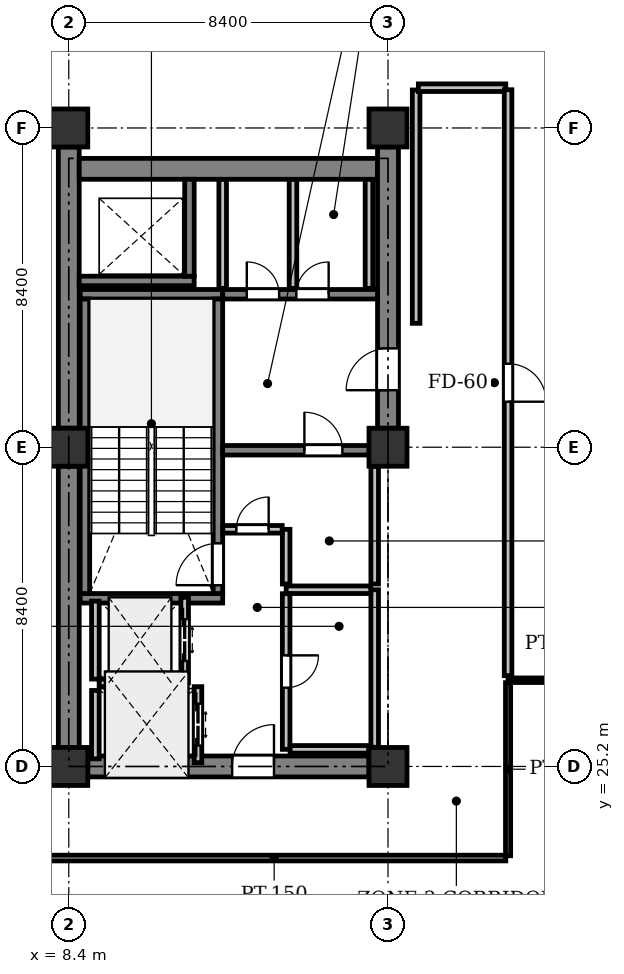
"""IFC4 building model, lengths in metres.
Left out: names, types, materials, properties, quantities, classifications, styles, units other than length and angle.
Written with IfcOpenShell. Run it as: python <this file> out.ifc"""

import sys

from ifc_helpers import new_model, si_unit, direction, frame, frame_2d, origin, origin_2d, place, context, subcontext, project, spatial, rectangle, extrude, element, fill, save


model = new_model("IFC4")
c1 = context("Model", 3, precision=1e-05, world=origin(), true_north=direction((0.0, 1.0)))
c2 = subcontext(c1, "Body", "Model", "MODEL_VIEW")
j1 = project(units=[si_unit("LENGTHUNIT", "METRE"), si_unit("PLANEANGLEUNIT", "RADIAN")], contexts=[c1])
p1 = place(None, origin())
s1 = spatial("IfcSite", under=j1, at=p1, CompositionType="ELEMENT")
p2 = place(p1, origin())
s2 = spatial("IfcBuilding", under=s1, at=p2, CompositionType="ELEMENT")
p3 = place(p2, frame((0.0, 0.0, 208.3)))
s3 = spatial("IfcBuildingStorey", under=s2, at=p3, CompositionType="ELEMENT", Elevation=208.3)
for number, where, z_axis, x_axis in (
    (1, (8.4, 25.2, 0.0), (0.0, 0.0, 1.0), (1.0, 0.0, 0.0)),
    (2, (8.4, 33.6, 0.0), (0.0, 0.0, 1.0), (1.0, 0.0, 0.0)),
    (3, (8.4, 42.0, 0.0), (0.0, 0.0, 1.0), (1.0, 0.0, 0.0)),
    (4, (16.8, 25.2, 0.0), (0.0, 0.0, 1.0), (1.0, 0.0, 0.0)),
    (5, (16.8, 33.6, 0.0), (0.0, 0.0, 1.0), (1.0, 0.0, 0.0)),
    (6, (16.8, 42.0, 0.0), (0.0, 0.0, 1.0), (1.0, 0.0, 0.0)),
):
    element("IfcColumn", number, at=place(p3, frame(where, z_axis=z_axis, x_axis=x_axis)), inside=s3, PredefinedType="COLUMN", context=c2, shape_type="SweptSolid", body=[
        extrude(rectangle(XDim=1.0, YDim=1.0, at=origin_2d()), origin(), (0.0, 0.0, 1.0), 4.1),
    ])
p4 = place(p3, frame((8.4, 25.7, 0.0), z_axis=(0.0, 0.0, 1.0), x_axis=(0.0, 1.0, 0.0)))
e7 = element("IfcWall", 7, at=p4, inside=s3, PredefinedType="SHEAR", context=c2, shape_type="SweptSolid", body=[
    extrude(rectangle(XDim=7.4, YDim=0.55, at=frame_2d((3.7, 0.0))), origin(), (0.0, 0.0, 1.0), 3.825),
])
p5 = place(p3, frame((8.4, 34.1, 0.0), z_axis=(0.0, 0.0, 1.0), x_axis=(0.0, 1.0, 0.0)))
e8 = element("IfcWall", 8, at=p5, inside=s3, PredefinedType="SHEAR", context=c2, shape_type="SweptSolid", body=[
    extrude(rectangle(XDim=7.4, YDim=0.55, at=frame_2d((3.7, 0.0))), origin(), (0.0, 0.0, 1.0), 3.825),
])
p6 = place(p3, frame((8.675, 40.925, 0.0), z_axis=(0.0, 0.0, 1.0), x_axis=(1.0, 0.0, 0.0)))
e9 = element("IfcWall", 9, at=p6, inside=s3, PredefinedType="SHEAR", context=c2, shape_type="SweptSolid", body=[
    extrude(rectangle(XDim=7.85, YDim=0.55, at=frame_2d((3.925, 0.0))), origin(), (0.0, 0.0, 1.0), 3.825),
])
p7 = place(p3, frame((16.8, 34.1, 0.0), z_axis=(0.0, 0.0, 1.0), x_axis=(0.0, 1.0, 0.0)))
e10 = element("IfcWall", 10, at=p7, inside=s3, PredefinedType="SHEAR", context=c2, shape_type="SweptSolid", body=[
    extrude(rectangle(XDim=7.4, YDim=0.55, at=frame_2d((3.7, 0.0))), origin(), (0.0, 0.0, 1.0), 3.825),
])
p8 = place(p7, frame((1.0, 0.0, 0.0)))
e11 = element("IfcOpeningElement", 11, at=p8, cuts=e10, PredefinedType="OPENING", context=c2, shape_type="SweptSolid", body=[
    extrude(rectangle(XDim=1.1, YDim=2.15, at=frame_2d((0.55, 1.075))), frame((0.0, 0.285, 0.0), z_axis=(0.0, -1.0, 0.0), x_axis=(1.0, 0.0, 0.0)), (0.0, 0.0, 1.0), 0.57),
])
p9 = place(p3, frame((8.9, 25.2, 0.0), z_axis=(0.0, 0.0, 1.0), x_axis=(1.0, 0.0, 0.0)))
e12 = element("IfcWall", 12, at=p9, inside=s3, PredefinedType="SHEAR", context=c2, shape_type="SweptSolid", body=[
    extrude(rectangle(XDim=7.4, YDim=0.55, at=frame_2d((3.7, 0.0))), origin(), (0.0, 0.0, 1.0), 3.825),
])
p10 = place(p9, frame((3.8, 0.0, 0.0)))
e13 = element("IfcOpeningElement", 13, at=p10, cuts=e12, PredefinedType="OPENING", context=c2, shape_type="SweptSolid", body=[
    extrude(rectangle(XDim=1.1, YDim=2.15, at=frame_2d((0.55, 1.075))), frame((0.0, 0.285, 0.0), z_axis=(0.0, -1.0, 0.0), x_axis=(1.0, 0.0, 0.0)), (0.0, 0.0, 1.0), 0.57),
])
for number, where, z_axis, x_axis in (
    (14, (12.45, 29.625, 0.0), (0.0, 0.0, 1.0), (-1.0, 0.0, 0.0)),
    (15, (12.45, 37.625, 0.0), (0.0, 0.0, 1.0), (-1.0, 0.0, 0.0)),
):
    element("IfcWall", number, at=place(p3, frame(where, z_axis=z_axis, x_axis=x_axis)), inside=s3, PredefinedType="SHEAR", context=c2, shape_type="SweptSolid", body=[
        extrude(rectangle(XDim=3.75, YDim=0.25, at=frame_2d((1.875, 0.0))), origin(), (0.0, 0.0, 1.0), 3.825),
    ])
p11 = place(p3, frame((12.325, 29.75, 0.0), z_axis=(0.0, 0.0, 1.0), x_axis=(0.0, 1.0, 0.0)))
e16 = element("IfcWall", 16, at=p11, inside=s3, PredefinedType="SHEAR", context=c2, shape_type="SweptSolid", body=[
    extrude(rectangle(XDim=7.75, YDim=0.25, at=frame_2d((3.875, 0.0))), origin(), (0.0, 0.0, 1.0), 3.825),
])
p12 = place(p11, frame((0.22, 0.0, 0.0)))
e17 = element("IfcOpeningElement", 17, at=p12, cuts=e16, PredefinedType="OPENING", context=c2, shape_type="SweptSolid", body=[
    extrude(rectangle(XDim=1.1, YDim=2.15, at=frame_2d((0.55, 1.075))), frame((0.0, 0.135, 0.0), z_axis=(0.0, -1.0, 0.0), x_axis=(1.0, 0.0, 0.0)), (0.0, 0.0, 1.0), 0.27),
])
p13 = place(p3, frame((8.825, 29.75, 0.0), z_axis=(0.0, 0.0, 1.0), x_axis=(0.0, 1.0, 0.0)))
e18 = element("IfcWall", 18, at=p13, inside=s3, PredefinedType="SHEAR", context=c2, shape_type="SweptSolid", body=[
    extrude(rectangle(XDim=7.75, YDim=0.25, at=frame_2d((3.875, 0.0))), origin(), (0.0, 0.0, 1.0), 3.825),
])
p14 = place(p3, frame((8.675, 37.975, 0.0), z_axis=(0.0, 0.0, 1.0), x_axis=(1.0, 0.0, 0.0)))
e19 = element("IfcWall", 19, at=p14, inside=s3, PredefinedType="SHEAR", context=c2, shape_type="SweptSolid", body=[
    extrude(rectangle(XDim=3.025, YDim=0.25, at=frame_2d((1.512, 0.0))), origin(), (0.0, 0.0, 1.0), 3.825),
])
p15 = place(p3, frame((11.575, 38.1, 0.0), z_axis=(0.0, 0.0, 1.0), x_axis=(0.0, 1.0, 0.0)))
e20 = element("IfcWall", 20, at=p15, inside=s3, PredefinedType="SHEAR", context=c2, shape_type="SweptSolid", body=[
    extrude(rectangle(XDim=2.55, YDim=0.25, at=frame_2d((1.275, 0.0))), origin(), (0.0, 0.0, 1.0), 3.825),
])
p16 = place(p3, frame((12.45, 33.52, 0.0), z_axis=(0.0, 0.0, 1.0), x_axis=(1.0, 0.0, 0.0)))
e21 = element("IfcWall", 21, at=p16, inside=s3, PredefinedType="SHEAR", context=c2, shape_type="SweptSolid", body=[
    extrude(rectangle(XDim=3.85, YDim=0.25, at=frame_2d((1.925, 0.0))), origin(), (0.0, 0.0, 1.0), 3.825),
])
p17 = place(p16, frame((2.15, 0.0, 0.0)))
e22 = element("IfcOpeningElement", 22, at=p17, cuts=e21, PredefinedType="OPENING", context=c2, shape_type="SweptSolid", body=[
    extrude(rectangle(XDim=1.0, YDim=2.15, at=frame_2d((0.5, 1.075))), frame((0.0, 0.135, 0.0), z_axis=(0.0, -1.0, 0.0), x_axis=(1.0, 0.0, 0.0)), (0.0, 0.0, 1.0), 0.27),
])
p18 = place(p3, frame((12.45, 37.625, 0.0), z_axis=(0.0, 0.0, 1.0), x_axis=(1.0, 0.0, 0.0)))
e23 = element("IfcWall", 23, at=p18, inside=s3, PredefinedType="SHEAR", context=c2, shape_type="SweptSolid", body=[
    extrude(rectangle(XDim=4.075, YDim=0.25, at=frame_2d((2.038, 0.0))), origin(), (0.0, 0.0, 1.0), 3.825),
])
p19 = place(p18, frame((0.635, 0.0, 0.0)))
e24 = element("IfcOpeningElement", 24, at=p19, cuts=e23, PredefinedType="OPENING", context=c2, shape_type="SweptSolid", body=[
    extrude(rectangle(XDim=0.85, YDim=2.15, at=frame_2d((0.425, 1.075))), frame((0.0, 0.135, 0.0), z_axis=(0.0, -1.0, 0.0), x_axis=(1.0, 0.0, 0.0)), (0.0, 0.0, 1.0), 0.27),
])
p20 = place(p18, frame((1.938, 0.0, 0.0)))
e25 = element("IfcOpeningElement", 25, at=p20, cuts=e23, PredefinedType="OPENING", context=c2, shape_type="SweptSolid", body=[
    extrude(rectangle(XDim=0.85, YDim=2.15, at=frame_2d((0.425, 1.075))), frame((0.0, 0.135, 0.0), z_axis=(0.0, -1.0, 0.0), x_axis=(1.0, 0.0, 0.0)), (0.0, 0.0, 1.0), 0.27),
])
p21 = place(p3, frame((11.45, 27.4, 0.0), z_axis=(0.0, 0.0, 1.0), x_axis=(0.0, 1.0, 0.0)))
e26 = element("IfcWall", 26, at=p21, inside=s3, PredefinedType="PARTITIONING", context=c2, shape_type="SweptSolid", body=[
    extrude(rectangle(XDim=2.25, YDim=0.2, at=frame_2d((1.125, 0.0))), origin(), (0.0, 0.0, 1.0), 3.825),
])
p22 = place(p21, frame((0.575, 0.0, 0.0)))
e27 = element("IfcOpeningElement", 27, at=p22, cuts=e26, PredefinedType="OPENING", context=c2, shape_type="SweptSolid", body=[
    extrude(rectangle(XDim=1.1, YDim=2.2, at=frame_2d((0.55, 1.1))), frame((0.0, 0.11, 0.0), z_axis=(0.0, -1.0, 0.0), x_axis=(1.0, 0.0, 0.0)), (0.0, 0.0, 1.0), 0.22),
])
p23 = place(p3, frame((9.1, 27.5, 0.0), z_axis=(0.0, 0.0, 1.0), x_axis=(0.0, 1.0, 0.0)))
e28 = element("IfcWall", 28, at=p23, inside=s3, PredefinedType="PARTITIONING", context=c2, shape_type="SweptSolid", body=[
    extrude(rectangle(XDim=2.05, YDim=0.2, at=frame_2d((1.025, 0.0))), origin(), (0.0, 0.0, 1.0), 3.825),
])
p24 = place(p3, frame((9.2, 27.4, 0.0), z_axis=(0.0, 0.0, 1.0), x_axis=(1.0, 0.0, 0.0)))
e29 = element("IfcWall", 29, at=p24, inside=s3, PredefinedType="PARTITIONING", context=c2, shape_type="SweptSolid", body=[
    extrude(rectangle(XDim=2.15, YDim=0.2, at=frame_2d((1.075, 0.0))), origin(), (0.0, 0.0, 1.0), 3.825),
])
p25 = place(p3, frame((11.8, 25.3, 0.0), z_axis=(0.0, 0.0, 1.0), x_axis=(0.0, 1.0, 0.0)))
e30 = element("IfcWall", 30, at=p25, inside=s3, PredefinedType="PARTITIONING", context=c2, shape_type="SweptSolid", body=[
    extrude(rectangle(XDim=2.0, YDim=0.2, at=frame_2d((1.0, 0.0))), origin(), (0.0, 0.0, 1.0), 3.825),
])
p26 = place(p25, frame((0.45, 0.0, 0.0)))
e31 = element("IfcOpeningElement", 31, at=p26, cuts=e30, PredefinedType="OPENING", context=c2, shape_type="SweptSolid", body=[
    extrude(rectangle(XDim=1.1, YDim=2.2, at=frame_2d((0.55, 1.1))), frame((0.0, 0.11, 0.0), z_axis=(0.0, -1.0, 0.0), x_axis=(1.0, 0.0, 0.0)), (0.0, 0.0, 1.0), 0.22),
])
p27 = place(p3, frame((9.1, 25.4, 0.0), z_axis=(0.0, 0.0, 1.0), x_axis=(0.0, 1.0, 0.0)))
e32 = element("IfcWall", 32, at=p27, inside=s3, PredefinedType="PARTITIONING", context=c2, shape_type="SweptSolid", body=[
    extrude(rectangle(XDim=1.8, YDim=0.2, at=frame_2d((0.9, 0.0))), origin(), (0.0, 0.0, 1.0), 3.825),
])
p28 = place(p3, frame((16.45, 25.705, 0.0), z_axis=(0.0, 0.0, 1.0), x_axis=(0.0, 1.0, 0.0)))
e33 = element("IfcWall", 33, at=p28, inside=s3, PredefinedType="PARTITIONING", context=c2, shape_type="SweptSolid", body=[
    extrude(rectangle(XDim=4.145, YDim=0.2, at=frame_2d((2.073, 0.0))), origin(), (0.0, 0.0, 1.0), 3.825),
])
p29 = place(p3, frame((16.346, 29.85, 0.0), z_axis=(0.0, 0.0, 1.0), x_axis=(-1.0, 0.0, 0.0)))
e34 = element("IfcWall", 34, at=p29, inside=s3, PredefinedType="PARTITIONING", context=c2, shape_type="SweptSolid", body=[
    extrude(rectangle(XDim=2.226, YDim=0.2, at=frame_2d((1.113, 0.0))), origin(), (0.0, 0.0, 1.0), 3.825),
])
p30 = place(p3, frame((14.12, 29.746, 0.0), z_axis=(0.0, 0.0, 1.0), x_axis=(0.0, -1.0, 0.0)))
e35 = element("IfcWall", 35, at=p30, inside=s3, PredefinedType="PARTITIONING", context=c2, shape_type="SweptSolid", body=[
    extrude(rectangle(XDim=4.096, YDim=0.2, at=frame_2d((2.048, 0.0))), origin(), (0.0, 0.0, 1.0), 3.825),
])
p31 = place(p30, frame((1.623, 0.0, 0.0)))
e36 = element("IfcOpeningElement", 36, at=p31, cuts=e35, PredefinedType="OPENING", context=c2, shape_type="SweptSolid", body=[
    extrude(rectangle(XDim=0.85, YDim=2.15, at=frame_2d((0.425, 1.075))), frame((0.0, 0.11, 0.0), z_axis=(0.0, -1.0, 0.0), x_axis=(1.0, 0.0, 0.0)), (0.0, 0.0, 1.0), 0.22),
])
p32 = place(p3, frame((14.224, 25.65, 0.0), z_axis=(0.0, 0.0, 1.0), x_axis=(1.0, 0.0, 0.0)))
e37 = element("IfcWall", 37, at=p32, inside=s3, PredefinedType="PARTITIONING", context=c2, shape_type="SweptSolid", body=[
    extrude(rectangle(XDim=2.071, YDim=0.2, at=frame_2d((1.035, 0.0))), origin(), (0.0, 0.0, 1.0), 3.825),
])
p33 = place(p3, frame((14.12, 31.44, 0.0), z_axis=(0.0, 0.0, 1.0), x_axis=(0.0, -1.0, 0.0)))
e38 = element("IfcWall", 38, at=p33, inside=s3, PredefinedType="PARTITIONING", context=c2, shape_type="SweptSolid", body=[
    extrude(rectangle(XDim=1.44, YDim=0.2, at=frame_2d((0.72, 0.0))), origin(), (0.0, 0.0, 1.0), 3.825),
])
p34 = place(p3, frame((16.45, 30.0, 0.0), z_axis=(0.0, 0.0, 1.0), x_axis=(0.0, 1.0, 0.0)))
e39 = element("IfcWall", 39, at=p34, inside=s3, PredefinedType="PARTITIONING", context=c2, shape_type="SweptSolid", body=[
    extrude(rectangle(XDim=3.095, YDim=0.2, at=frame_2d((1.547, 0.0))), origin(), (0.0, 0.0, 1.0), 3.825),
])
p35 = place(p3, frame((12.454, 31.44, 0.0), z_axis=(0.0, 0.0, 1.0), x_axis=(1.0, 0.0, 0.0)))
e40 = element("IfcWall", 40, at=p35, inside=s3, PredefinedType="PARTITIONING", context=c2, shape_type="SweptSolid", body=[
    extrude(rectangle(XDim=1.562, YDim=0.2, at=frame_2d((0.781, 0.0))), origin(), (0.0, 0.0, 1.0), 3.825),
])
p36 = place(p35, frame((0.356, 0.0, 0.0)))
e41 = element("IfcOpeningElement", 41, at=p36, cuts=e40, PredefinedType="OPENING", context=c2, shape_type="SweptSolid", body=[
    extrude(rectangle(XDim=0.85, YDim=2.15, at=frame_2d((0.425, 1.075))), frame((0.0, 0.11, 0.0), z_axis=(0.0, -1.0, 0.0), x_axis=(1.0, 0.0, 0.0)), (0.0, 0.0, 1.0), 0.22),
])
for number, where, z_axis, x_axis in (
    (42, (14.3, 37.78, 0.0), (0.0, 0.0, 1.0), (0.0, 1.0, 0.0)),
    (43, (12.45, 40.646, 0.0), (0.0, 0.0, 1.0), (0.0, -1.0, 0.0)),
    (44, (16.3, 37.78, 0.0), (0.0, 0.0, 1.0), (0.0, 1.0, 0.0)),
):
    element("IfcWall", number, at=place(p3, frame(where, z_axis=z_axis, x_axis=x_axis)), inside=s3, PredefinedType="PARTITIONING", context=c2, shape_type="SweptSolid", body=[
        extrude(rectangle(XDim=2.866, YDim=0.2, at=frame_2d((1.433, 0.0))), origin(), (0.0, 0.0, 1.0), 2.875),
    ])
p37 = place(p3, frame((22.594, 27.469, 0.0), z_axis=(0.0, 0.0, 1.0), x_axis=(-1.0, 0.0, 0.0)))
e45 = element("IfcWall", 45, at=p37, inside=s3, PredefinedType="PARTITIONING", context=c2, shape_type="SweptSolid", body=[
    extrude(rectangle(XDim=2.634, YDim=0.12, at=frame_2d((1.317, 0.0))), origin(), (0.0, 0.0, 1.0), 3.518),
])
p38 = place(p3, frame((19.96, 27.405, 0.0), z_axis=(0.0, 0.0, 1.0), x_axis=(0.0, -1.0, 0.0)))
e46 = element("IfcWall", 46, at=p38, inside=s3, PredefinedType="PARTITIONING", context=c2, shape_type="SweptSolid", body=[
    extrude(rectangle(XDim=4.555, YDim=0.135, at=frame_2d((2.278, 0.0))), origin(), (0.0, 0.0, 1.0), 3.365),
])
p39 = place(p3, frame((19.9, 22.79, 0.0), z_axis=(0.0, 0.0, 1.0), x_axis=(-1.0, 0.0, 0.0)))
e47 = element("IfcWall", 47, at=p39, inside=s3, PredefinedType="PARTITIONING", context=c2, shape_type="SweptSolid", body=[
    extrude(rectangle(XDim=12.19, YDim=0.15, at=frame_2d((6.095, 0.0))), origin(), (0.0, 0.0, 1.0), 3.371),
])
p40 = place(p3, frame((17.54, 36.86, 0.0), z_axis=(0.0, 0.0, 1.0), x_axis=(0.0, 1.0, 0.0)))
e48 = element("IfcWall", 48, at=p40, inside=s3, PredefinedType="PARTITIONING", context=c2, shape_type="SweptSolid", body=[
    extrude(rectangle(XDim=6.14, YDim=0.2, at=frame_2d((3.07, 0.0))), origin(), (0.0, 0.0, 1.0), 3.365),
])
p41 = place(p3, frame((17.6, 43.06, 0.0), z_axis=(0.0, 0.0, 1.0), x_axis=(1.0, 0.0, 0.0)))
e49 = element("IfcWall", 49, at=p41, inside=s3, PredefinedType="PARTITIONING", context=c2, shape_type="SweptSolid", body=[
    extrude(rectangle(XDim=2.3, YDim=0.2, at=frame_2d((1.15, 0.0))), origin(), (0.0, 0.0, 1.0), 3.825),
])
p42 = place(p3, frame((19.96, 43.006, 0.0), z_axis=(0.0, 0.0, 1.0), x_axis=(1.5836065e-05, -0.999999999875, 0.0)))
e50 = element("IfcWall", 50, at=p42, inside=s3, PredefinedType="PARTITIONING", context=c2, shape_type="SweptSolid", body=[
    extrude(rectangle(XDim=15.417, YDim=0.2, at=frame_2d((7.708, 0.0))), origin(), (0.0, 0.0, 1.0), 3.365),
])
p43 = place(p42, frame((7.208, 0.0, 0.0)))
e51 = element("IfcOpeningElement", 51, at=p43, cuts=e50, PredefinedType="OPENING", context=c2, shape_type="SweptSolid", body=[
    extrude(rectangle(XDim=1.0, YDim=2.15, at=frame_2d((0.5, 1.075))), frame((0.0, 0.11, 0.0), z_axis=(0.0, -1.0, 0.0), x_axis=(1.0, 0.0, 0.0)), (0.0, 0.0, 1.0), 0.22),
])
p44 = place(p8, origin())
e52 = element("IfcDoor", 52, at=p44, inside=s3, OperationType="SINGLE_SWING_LEFT", PredefinedType="DOOR", context=c2, shape_type="SweptSolid", body=[
    extrude(rectangle(XDim=1.1, YDim=2.15, at=frame_2d((0.55, 1.075))), frame((0.0, 0.025, 0.0), z_axis=(0.0, -1.0, 0.0), x_axis=(1.0, 0.0, 0.0)), (0.0, 0.0, 1.0), 0.05),
])
fill(e11, e52)
p45 = place(p10, origin())
e53 = element("IfcDoor", 53, at=p45, inside=s3, OperationType="SINGLE_SWING_RIGHT", PredefinedType="DOOR", context=c2, shape_type="SweptSolid", body=[
    extrude(rectangle(XDim=1.1, YDim=2.15, at=frame_2d((0.55, 1.075))), frame((0.0, 0.025, 0.0), z_axis=(0.0, -1.0, 0.0), x_axis=(1.0, 0.0, 0.0)), (0.0, 0.0, 1.0), 0.05),
])
fill(e13, e53)
p46 = place(p12, origin())
e54 = element("IfcDoor", 54, at=p46, inside=s3, OperationType="SINGLE_SWING_LEFT", PredefinedType="DOOR", context=c2, shape_type="SweptSolid", body=[
    extrude(rectangle(XDim=1.1, YDim=2.15, at=frame_2d((0.55, 1.075))), frame((0.0, 0.025, 0.0), z_axis=(0.0, -1.0, 0.0), x_axis=(1.0, 0.0, 0.0)), (0.0, 0.0, 1.0), 0.05),
])
fill(e17, e54)
p47 = place(p17, origin())
e55 = element("IfcDoor", 55, at=p47, inside=s3, OperationType="SINGLE_SWING_LEFT", PredefinedType="DOOR", context=c2, shape_type="SweptSolid", body=[
    extrude(rectangle(XDim=1.0, YDim=2.15, at=frame_2d((0.5, 1.075))), frame((0.0, 0.025, 0.0), z_axis=(0.0, -1.0, 0.0), x_axis=(1.0, 0.0, 0.0)), (0.0, 0.0, 1.0), 0.05),
])
fill(e22, e55)
p48 = place(p22, origin())
e56 = element("IfcDoor", 56, at=p48, inside=s3, OperationType="DOUBLE_DOOR_SLIDING", PredefinedType="DOOR", context=c2, shape_type="SweptSolid", body=[
    extrude(rectangle(XDim=1.1, YDim=2.2, at=frame_2d((0.55, 1.1))), frame((0.0, 0.025, 0.0), z_axis=(0.0, -1.0, 0.0), x_axis=(1.0, 0.0, 0.0)), (0.0, 0.0, 1.0), 0.05),
])
fill(e27, e56)
p49 = place(p26, origin())
e57 = element("IfcDoor", 57, at=p49, inside=s3, OperationType="DOUBLE_DOOR_SLIDING", PredefinedType="DOOR", context=c2, shape_type="SweptSolid", body=[
    extrude(rectangle(XDim=1.1, YDim=2.2, at=frame_2d((0.55, 1.1))), frame((0.0, 0.025, 0.0), z_axis=(0.0, -1.0, 0.0), x_axis=(1.0, 0.0, 0.0)), (0.0, 0.0, 1.0), 0.05),
])
fill(e31, e57)
p50 = place(p31, origin())
e58 = element("IfcDoor", 58, at=p50, inside=s3, OperationType="SINGLE_SWING_LEFT", PredefinedType="DOOR", context=c2, shape_type="SweptSolid", body=[
    extrude(rectangle(XDim=0.85, YDim=2.15, at=frame_2d((0.425, 1.075))), frame((0.0, 0.025, 0.0), z_axis=(0.0, -1.0, 0.0), x_axis=(1.0, 0.0, 0.0)), (0.0, 0.0, 1.0), 0.05),
])
fill(e36, e58)
p51 = place(p36, origin())
e59 = element("IfcDoor", 59, at=p51, inside=s3, OperationType="SINGLE_SWING_RIGHT", PredefinedType="DOOR", context=c2, shape_type="SweptSolid", body=[
    extrude(rectangle(XDim=0.85, YDim=2.15, at=frame_2d((0.425, 1.075))), frame((0.0, 0.025, 0.0), z_axis=(0.0, -1.0, 0.0), x_axis=(1.0, 0.0, 0.0)), (0.0, 0.0, 1.0), 0.05),
])
fill(e41, e59)
p52 = place(p19, origin())
e60 = element("IfcDoor", 60, at=p52, inside=s3, OperationType="SINGLE_SWING_LEFT", PredefinedType="DOOR", context=c2, shape_type="SweptSolid", body=[
    extrude(rectangle(XDim=0.85, YDim=2.15, at=frame_2d((0.425, 1.075))), frame((0.0, 0.025, 0.0), z_axis=(0.0, -1.0, 0.0), x_axis=(1.0, 0.0, 0.0)), (0.0, 0.0, 1.0), 0.05),
])
fill(e24, e60)
p53 = place(p20, origin())
e61 = element("IfcDoor", 61, at=p53, inside=s3, OperationType="SINGLE_SWING_RIGHT", PredefinedType="DOOR", context=c2, shape_type="SweptSolid", body=[
    extrude(rectangle(XDim=0.85, YDim=2.15, at=frame_2d((0.425, 1.075))), frame((0.0, 0.025, 0.0), z_axis=(0.0, -1.0, 0.0), x_axis=(1.0, 0.0, 0.0)), (0.0, 0.0, 1.0), 0.05),
])
fill(e25, e61)
p54 = place(p43, origin())
e62 = element("IfcDoor", 62, at=p54, inside=s3, OperationType="SINGLE_SWING_RIGHT", PredefinedType="DOOR", context=c2, shape_type="SweptSolid", body=[
    extrude(rectangle(XDim=1.0, YDim=2.15, at=frame_2d((0.5, 1.075))), frame((0.0, 0.025, 0.0), z_axis=(0.0, -1.0, 0.0), x_axis=(1.0, 0.0, 0.0)), (0.0, 0.0, 1.0), 0.05),
])
fill(e51, e62)
save(model, sys.argv[1])
